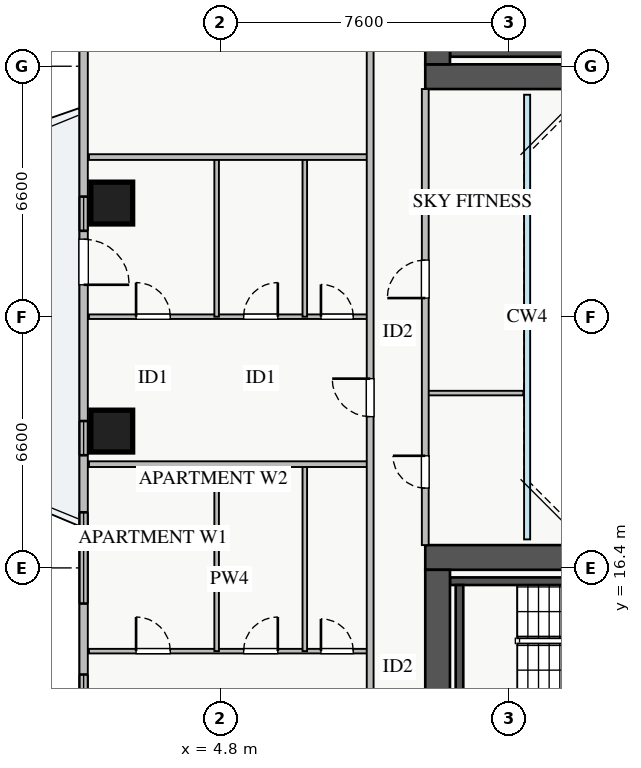
"""IFC4 building model, lengths in metres.
Left out: names, types, materials, properties, quantities, classifications, styles, units other than length and angle.
Written with IfcOpenShell. Run it as: python <this file> out.ifc"""

import sys

from ifc_helpers import new_model, si_unit, direction, frame, frame_2d, origin, origin_2d, place, context, subcontext, project, spatial, rectangle, extrude, source, transform, mapped, element, fill, save


model = new_model("IFC4")
c1 = context("Model", 3, precision=1e-05, world=origin(), true_north=direction((0.0, 1.0)))
c2 = subcontext(c1, "Body", "Model", "MODEL_VIEW")
j1 = project(units=[si_unit("LENGTHUNIT", "METRE"), si_unit("PLANEANGLEUNIT", "RADIAN")], contexts=[c1])
p1 = place(None, origin())
s1 = spatial("IfcSite", under=j1, at=p1, CompositionType="ELEMENT")
p2 = place(p1, origin())
s2 = spatial("IfcBuilding", under=s1, at=p2, CompositionType="ELEMENT")
p3 = place(p2, frame((0.0, 0.0, 106.75)))
s3 = spatial("IfcBuildingStorey", under=s2, at=p3, CompositionType="ELEMENT", Elevation=106.75)
for number, where, z_axis, x_axis in (
    (1, (10.85, 29.95, 0.0), (0.0, 0.0, 1.0), (1.0, 0.0, 0.0)),
    (2, (10.85, 16.05, 0.0), (0.0, 0.0, 1.0), (1.0, 0.0, 0.0)),
):
    element("IfcWall", number, at=place(p3, frame(where, z_axis=z_axis, x_axis=x_axis)), inside=s3, PredefinedType="SHEAR", context=c2, shape_type="SweptSolid", body=[
        extrude(rectangle(XDim=7.3, YDim=0.2, at=frame_2d((3.65, 0.0))), origin(), (0.0, 0.0, 1.0), 3.25),
    ])
p4 = place(p3, frame((11.1, 13.01, 0.0), z_axis=(0.0, 0.0, 1.0), x_axis=(0.0, 1.0, 0.0)))
e3 = element("IfcWall", 3, at=p4, inside=s3, PredefinedType="SHEAR", context=c2, shape_type="SweptSolid", body=[
    extrude(rectangle(XDim=2.94, YDim=0.2, at=frame_2d((1.47, 0.0))), origin(), (0.0, 0.0, 1.0), 3.25),
])
p5 = place(p3, frame((10.2, 29.325, 0.0), z_axis=(0.0, 0.0, 1.0), x_axis=(1.0, 0.0, 0.0)))
e4 = element("IfcWall", 4, at=p5, inside=s3, PredefinedType="SHEAR", context=c2, shape_type="SweptSolid", body=[
    extrude(rectangle(XDim=17.6, YDim=0.65, at=frame_2d((8.8, 0.0))), origin(), (0.0, 0.0, 1.0), 3.25),
])
p6 = place(p3, frame((10.525, 29.65, 0.0), z_axis=(0.0, 0.0, 1.0), x_axis=(0.0, 1.0, 0.0)))
e5 = element("IfcWall", 5, at=p6, inside=s3, PredefinedType="SHEAR", context=c2, shape_type="SweptSolid", body=[
    extrude(rectangle(XDim=5.9, YDim=0.65, at=frame_2d((2.95, 0.0))), origin(), (0.0, 0.0, 1.0), 3.25),
])
p7 = place(p3, frame((10.2, 16.675, 0.0), z_axis=(0.0, 0.0, 1.0), x_axis=(1.0, 0.0, 0.0)))
e6 = element("IfcWall", 6, at=p7, inside=s3, PredefinedType="SHEAR", context=c2, shape_type="SweptSolid", body=[
    extrude(rectangle(XDim=17.6, YDim=0.65, at=frame_2d((8.8, 0.0))), origin(), (0.0, 0.0, 1.0), 3.25),
])
p8 = place(p3, frame((10.525, 10.45, 0.0), z_axis=(0.0, 0.0, 1.0), x_axis=(0.0, 1.0, 0.0)))
e7 = element("IfcWall", 7, at=p8, inside=s3, PredefinedType="SHEAR", context=c2, shape_type="SweptSolid", body=[
    extrude(rectangle(XDim=5.9, YDim=0.65, at=frame_2d((2.95, 0.0))), origin(), (0.0, 0.0, 1.0), 3.25),
])
m1 = source(origin(), c2, "Body", "SweptSolid", [
    extrude(rectangle(XDim=1.1, YDim=1.1, at=origin_2d()), origin(), (0.0, 0.0, 1.0), 3.25),
])
for number, where, z_axis, x_axis in (
    (8, (1.95, 26.0, 0.0), (0.0, 0.0, 1.0), (1.0, 0.0, 0.0)),
    (9, (1.95, 20.0, 0.0), (0.0, 0.0, 1.0), (1.0, 0.0, 0.0)),
):
    element("IfcColumn", number, at=place(p3, frame(where, z_axis=z_axis, x_axis=x_axis)), inside=s3, PredefinedType="COLUMN", context=c2, shape_type="MappedRepresentation", body=[
        mapped(m1, transform((0.0, 0.0, 0.0), x_axis=(1.0, 0.0, 0.0), y_axis=(0.0, 1.0, 0.0), z_axis=(0.0, 0.0, 1.0), scale=1.0)),
    ])
p9 = place(p3, frame((1.21, 10.55, 0.0), z_axis=(0.0, 0.0, 1.0), x_axis=(0.0, 1.0, 0.0)))
e10 = element("IfcWall", 10, at=p9, inside=s3, PredefinedType="STANDARD", context=c2, shape_type="SweptSolid", body=[
    extrude(rectangle(XDim=24.9, YDim=0.22, at=frame_2d((12.45, 0.0))), origin(), (0.0, 0.0, 1.0), 2.61),
])
p10 = place(p9, frame((13.3, 0.0, 0.0)))
e11 = element("IfcOpeningElement", 11, at=p10, cuts=e10, PredefinedType="OPENING", context=c2, shape_type="SweptSolid", body=[
    extrude(rectangle(XDim=1.2, YDim=2.1, at=frame_2d((0.6, 1.05))), frame((0.0, 0.12, 0.0), z_axis=(0.0, -1.0, 0.0), x_axis=(1.0, 0.0, 0.0)), (0.0, 0.0, 1.0), 0.24),
])
p11 = place(p9, frame((0.645, 0.0, 0.9)))
e12 = element("IfcOpeningElement", 12, at=p11, cuts=e10, PredefinedType="OPENING", context=c2, shape_type="SweptSolid", body=[
    extrude(rectangle(XDim=2.4, YDim=1.5, at=frame_2d((1.2, 0.75))), frame((0.0, 0.12, 0.0), z_axis=(0.0, -1.0, 0.0), x_axis=(1.0, 0.0, 0.0)), (0.0, 0.0, 1.0), 0.24),
])
p12 = place(p9, frame((20.737, 0.0, 0.9)))
e13 = element("IfcOpeningElement", 13, at=p12, cuts=e10, PredefinedType="OPENING", context=c2, shape_type="SweptSolid", body=[
    extrude(rectangle(XDim=2.1, YDim=1.48, at=frame_2d((1.05, 0.74))), frame((0.0, 0.12, 0.0), z_axis=(0.0, -1.0, 0.0), x_axis=(1.0, 0.0, 0.0)), (0.0, 0.0, 1.0), 0.24),
])
p13 = place(p9, frame((4.913, 0.0, 0.9)))
e14 = element("IfcOpeningElement", 14, at=p13, cuts=e10, PredefinedType="OPENING", context=c2, shape_type="SweptSolid", body=[
    extrude(rectangle(XDim=2.4, YDim=1.5, at=frame_2d((1.2, 0.75))), frame((0.0, 0.12, 0.0), z_axis=(0.0, -1.0, 0.0), x_axis=(1.0, 0.0, 0.0)), (0.0, 0.0, 1.0), 0.24),
])
p14 = place(p9, frame((14.72, 0.0, 0.9)))
e15 = element("IfcOpeningElement", 15, at=p14, cuts=e10, PredefinedType="OPENING", context=c2, shape_type="SweptSolid", body=[
    extrude(rectangle(XDim=0.9, YDim=1.2, at=frame_2d((0.45, 0.6))), frame((0.0, 0.12, 0.0), z_axis=(0.0, -1.0, 0.0), x_axis=(1.0, 0.0, 0.0)), (0.0, 0.0, 1.0), 0.24),
])
p15 = place(p9, frame((8.815, 0.0, 0.9)))
e16 = element("IfcOpeningElement", 16, at=p15, cuts=e10, PredefinedType="OPENING", context=c2, shape_type="SweptSolid", body=[
    extrude(rectangle(XDim=0.9, YDim=1.2, at=frame_2d((0.45, 0.6))), frame((0.0, 0.12, 0.0), z_axis=(0.0, -1.0, 0.0), x_axis=(1.0, 0.0, 0.0)), (0.0, 0.0, 1.0), 0.24),
])
p16 = place(p3, frame((1.35, 14.21, 0.0), z_axis=(0.0, 0.0, 1.0), x_axis=(1.0, 0.0, 0.0)))
e17 = element("IfcWall", 17, at=p16, inside=s3, PredefinedType="PLUMBINGWALL", context=c2, shape_type="SweptSolid", body=[
    extrude(rectangle(XDim=7.4, YDim=0.12, at=frame_2d((3.7, 0.0))), origin(), (0.0, 0.0, 1.0), 3.07),
])
p17 = place(p16, frame((1.24, 0.0, 0.0)))
e18 = element("IfcOpeningElement", 18, at=p17, cuts=e17, PredefinedType="OPENING", context=c2, shape_type="SweptSolid", body=[
    extrude(rectangle(XDim=0.9, YDim=2.05, at=frame_2d((0.45, 1.025))), frame((0.0, 0.07, 0.0), z_axis=(0.0, -1.0, 0.0), x_axis=(1.0, 0.0, 0.0)), (0.0, 0.0, 1.0), 0.14),
])
p18 = place(p16, frame((4.07, 0.0, 0.0)))
e19 = element("IfcOpeningElement", 19, at=p18, cuts=e17, PredefinedType="OPENING", context=c2, shape_type="SweptSolid", body=[
    extrude(rectangle(XDim=0.9, YDim=2.05, at=frame_2d((0.45, 1.025))), frame((0.0, 0.07, 0.0), z_axis=(0.0, -1.0, 0.0), x_axis=(1.0, 0.0, 0.0)), (0.0, 0.0, 1.0), 0.14),
])
p19 = place(p16, frame((6.105, 0.0, 0.0)))
e20 = element("IfcOpeningElement", 20, at=p19, cuts=e17, PredefinedType="OPENING", context=c2, shape_type="SweptSolid", body=[
    extrude(rectangle(XDim=0.85, YDim=2.05, at=frame_2d((0.425, 1.025))), frame((0.0, 0.07, 0.0), z_axis=(0.0, -1.0, 0.0), x_axis=(1.0, 0.0, 0.0)), (0.0, 0.0, 1.0), 0.14),
])
for number, where, z_axis, x_axis in (
    (21, (4.71, 14.21, 0.0), (0.0, 0.0, 1.0), (0.0, 1.0, 0.0)),
    (22, (7.03, 14.21, 0.0), (0.0, 0.0, 1.0), (0.0, 1.0, 0.0)),
):
    element("IfcWall", number, at=place(p3, frame(where, z_axis=z_axis, x_axis=x_axis)), inside=s3, PredefinedType="PLUMBINGWALL", context=c2, shape_type="SweptSolid", body=[
        extrude(rectangle(XDim=4.92, YDim=0.12, at=frame_2d((2.46, 0.0))), origin(), (0.0, 0.0, 1.0), 3.07),
    ])
p20 = place(p3, frame((1.35, 23.01, 0.0), z_axis=(0.0, 0.0, 1.0), x_axis=(1.0, 0.0, 0.0)))
e23 = element("IfcWall", 23, at=p20, inside=s3, PredefinedType="PLUMBINGWALL", context=c2, shape_type="SweptSolid", body=[
    extrude(rectangle(XDim=7.4, YDim=0.12, at=frame_2d((3.7, 0.0))), origin(), (0.0, 0.0, 1.0), 3.07),
])
p21 = place(p20, frame((1.24, 0.0, 0.0)))
e24 = element("IfcOpeningElement", 24, at=p21, cuts=e23, PredefinedType="OPENING", context=c2, shape_type="SweptSolid", body=[
    extrude(rectangle(XDim=0.9, YDim=2.05, at=frame_2d((0.45, 1.025))), frame((0.0, 0.07, 0.0), z_axis=(0.0, -1.0, 0.0), x_axis=(1.0, 0.0, 0.0)), (0.0, 0.0, 1.0), 0.14),
])
p22 = place(p20, frame((4.07, 0.0, 0.0)))
e25 = element("IfcOpeningElement", 25, at=p22, cuts=e23, PredefinedType="OPENING", context=c2, shape_type="SweptSolid", body=[
    extrude(rectangle(XDim=0.9, YDim=2.05, at=frame_2d((0.45, 1.025))), frame((0.0, 0.07, 0.0), z_axis=(0.0, -1.0, 0.0), x_axis=(1.0, 0.0, 0.0)), (0.0, 0.0, 1.0), 0.14),
])
p23 = place(p20, frame((6.105, 0.0, 0.0)))
e26 = element("IfcOpeningElement", 26, at=p23, cuts=e23, PredefinedType="OPENING", context=c2, shape_type="SweptSolid", body=[
    extrude(rectangle(XDim=0.85, YDim=2.05, at=frame_2d((0.425, 1.025))), frame((0.0, 0.07, 0.0), z_axis=(0.0, -1.0, 0.0), x_axis=(1.0, 0.0, 0.0)), (0.0, 0.0, 1.0), 0.14),
])
for number, where, z_axis, x_axis in (
    (27, (4.71, 23.01, 0.0), (0.0, 0.0, 1.0), (0.0, 1.0, 0.0)),
    (28, (7.03, 23.01, 0.0), (0.0, 0.0, 1.0), (0.0, 1.0, 0.0)),
):
    element("IfcWall", number, at=place(p3, frame(where, z_axis=z_axis, x_axis=x_axis)), inside=s3, PredefinedType="PLUMBINGWALL", context=c2, shape_type="SweptSolid", body=[
        extrude(rectangle(XDim=4.2, YDim=0.12, at=frame_2d((2.1, 0.0))), origin(), (0.0, 0.0, 1.0), 3.07),
    ])
for number, where, z_axis, x_axis in (
    (29, (1.35, 19.13, 0.0), (0.0, 0.0, 1.0), (1.0, 0.0, 0.0)),
    (30, (1.35, 27.21, 0.0), (0.0, 0.0, 1.0), (1.0, 0.0, 0.0)),
):
    element("IfcWall", number, at=place(p3, frame(where, z_axis=z_axis, x_axis=x_axis)), inside=s3, PredefinedType="PARTITIONING", context=c2, shape_type="SweptSolid", body=[
        extrude(rectangle(XDim=7.4, YDim=0.15, at=frame_2d((3.7, 0.0))), origin(), (0.0, 0.0, 1.0), 3.07),
    ])
p24 = place(p3, frame((8.75, 8.3, 0.0), z_axis=(0.0, 0.0, 1.0), x_axis=(0.0, 1.0, 0.0)))
e31 = element("IfcWall", 31, at=p24, inside=s3, PredefinedType="PARTITIONING", context=c2, shape_type="SweptSolid", body=[
    extrude(rectangle(XDim=29.4, YDim=0.18, at=frame_2d((14.7, 0.0))), origin(), (0.0, 0.0, 1.0), 3.07),
])
p25 = place(p24, frame((28.08, 0.0, 0.0)))
e32 = element("IfcOpeningElement", 32, at=p25, cuts=e31, PredefinedType="OPENING", context=c2, shape_type="SweptSolid", body=[
    extrude(rectangle(XDim=0.9, YDim=2.05, at=frame_2d((0.45, 1.025))), frame((0.0, 0.1, 0.0), z_axis=(0.0, -1.0, 0.0), x_axis=(1.0, 0.0, 0.0)), (0.0, 0.0, 1.0), 0.2),
])
p26 = place(p24, frame((0.245, 0.0, 0.0)))
e33 = element("IfcOpeningElement", 33, at=p26, cuts=e31, PredefinedType="OPENING", context=c2, shape_type="SweptSolid", body=[
    extrude(rectangle(XDim=0.9, YDim=2.05, at=frame_2d((0.45, 1.025))), frame((0.0, 0.1, 0.0), z_axis=(0.0, -1.0, 0.0), x_axis=(1.0, 0.0, 0.0)), (0.0, 0.0, 1.0), 0.2),
])
p27 = place(p24, frame((2.95, 0.0, 0.0)))
e34 = element("IfcOpeningElement", 34, at=p27, cuts=e31, PredefinedType="OPENING", context=c2, shape_type="SweptSolid", body=[
    extrude(rectangle(XDim=1.0, YDim=2.05, at=frame_2d((0.5, 1.025))), frame((0.0, 0.1, 0.0), z_axis=(0.0, -1.0, 0.0), x_axis=(1.0, 0.0, 0.0)), (0.0, 0.0, 1.0), 0.2),
])
p28 = place(p24, frame((12.08, 0.0, 0.0)))
e35 = element("IfcOpeningElement", 35, at=p28, cuts=e31, PredefinedType="OPENING", context=c2, shape_type="SweptSolid", body=[
    extrude(rectangle(XDim=1.0, YDim=2.05, at=frame_2d((0.5, 1.025))), frame((0.0, 0.1, 0.0), z_axis=(0.0, -1.0, 0.0), x_axis=(1.0, 0.0, 0.0)), (0.0, 0.0, 1.0), 0.2),
])
p29 = place(p24, frame((22.795, 0.0, 0.0)))
e36 = element("IfcOpeningElement", 36, at=p29, cuts=e31, PredefinedType="OPENING", context=c2, shape_type="SweptSolid", body=[
    extrude(rectangle(XDim=1.0, YDim=2.05, at=frame_2d((0.5, 1.025))), frame((0.0, 0.1, 0.0), z_axis=(0.0, -1.0, 0.0), x_axis=(1.0, 0.0, 0.0)), (0.0, 0.0, 1.0), 0.2),
])
p30 = place(p3, frame((10.2, 21.0, 0.0), z_axis=(0.0, 0.0, 1.0), x_axis=(1.0, 0.0, 0.0)))
e37 = element("IfcWall", 37, at=p30, inside=s3, PredefinedType="PLUMBINGWALL", context=c2, shape_type="SweptSolid", body=[
    extrude(rectangle(XDim=2.58, YDim=0.12, at=frame_2d((1.29, 0.0))), origin(), (0.0, 0.0, 1.0), 3.07),
])
p31 = place(p3, frame((10.2, 17.0, 0.0), z_axis=(0.0, 0.0, 1.0), x_axis=(0.0, 1.0, 0.0)))
e38 = element("IfcWall", 38, at=p31, inside=s3, PredefinedType="PARTITIONING", context=c2, shape_type="SweptSolid", body=[
    extrude(rectangle(XDim=12.0, YDim=0.18, at=frame_2d((6.0, 0.0))), origin(), (0.0, 0.0, 1.0), 3.07),
])
p32 = place(p31, frame((1.5, 0.0, 0.0)))
e39 = element("IfcOpeningElement", 39, at=p32, cuts=e38, PredefinedType="OPENING", context=c2, shape_type="SweptSolid", body=[
    extrude(rectangle(XDim=0.85, YDim=2.05, at=frame_2d((0.425, 1.025))), frame((0.0, 0.1, 0.0), z_axis=(0.0, -1.0, 0.0), x_axis=(1.0, 0.0, 0.0)), (0.0, 0.0, 1.0), 0.2),
])
p33 = place(p31, frame((6.5, 0.0, 0.0)))
e40 = element("IfcOpeningElement", 40, at=p33, cuts=e38, PredefinedType="OPENING", context=c2, shape_type="SweptSolid", body=[
    extrude(rectangle(XDim=1.0, YDim=2.05, at=frame_2d((0.5, 1.025))), frame((0.0, 0.1, 0.0), z_axis=(0.0, -1.0, 0.0), x_axis=(1.0, 0.0, 0.0)), (0.0, 0.0, 1.0), 0.2),
])
m2 = source(origin(), c2, "Body", "SweptSolid", [
    extrude(rectangle(XDim=1.2, YDim=2.1, at=frame_2d((0.6, 1.05))), frame((0.0, 0.025, 0.0), z_axis=(0.0, -1.0, 0.0), x_axis=(1.0, 0.0, 0.0)), (0.0, 0.0, 1.0), 0.05),
])
p34 = place(p10, frame((1.2, 0.0, 0.0), z_axis=(0.0, 0.0, 1.0), x_axis=(-1.0, 0.0, 0.0)))
e41 = element("IfcDoor", 41, at=p34, inside=s3, OperationType="SINGLE_SWING_LEFT", PredefinedType="DOOR", context=c2, shape_type="MappedRepresentation", body=[
    mapped(m2, transform((0.0, 0.0, 0.0), x_axis=(1.0, 0.0, 0.0), y_axis=(0.0, 1.0, 0.0), z_axis=(0.0, 0.0, 1.0), scale=1.0)),
])
fill(e11, e41)
m3 = source(origin(), c2, "Body", "SweptSolid", [
    extrude(rectangle(XDim=2.4, YDim=1.5, at=frame_2d((1.2, 0.75))), frame((0.0, 0.03, 0.0), z_axis=(0.0, -1.0, 0.0), x_axis=(1.0, 0.0, 0.0)), (0.0, 0.0, 1.0), 0.06),
])
p35 = place(p11, origin())
e42 = element("IfcWindow", 42, at=p35, inside=s3, PartitioningType="TRIPLE_PANEL_VERTICAL", PredefinedType="WINDOW", context=c2, shape_type="MappedRepresentation", body=[
    mapped(m3, transform((0.0, 0.0, 0.0), x_axis=(1.0, 0.0, 0.0), y_axis=(0.0, 1.0, 0.0), z_axis=(0.0, 0.0, 1.0), scale=1.0)),
])
fill(e12, e42)
m4 = source(origin(), c2, "Body", "SweptSolid", [
    extrude(rectangle(XDim=0.9, YDim=2.05, at=frame_2d((0.45, 1.025))), frame((0.0, 0.025, 0.0), z_axis=(0.0, -1.0, 0.0), x_axis=(1.0, 0.0, 0.0)), (0.0, 0.0, 1.0), 0.05),
])
p36 = place(p17, origin())
e43 = element("IfcDoor", 43, at=p36, inside=s3, OperationType="SINGLE_SWING_LEFT", PredefinedType="DOOR", context=c2, shape_type="MappedRepresentation", body=[
    mapped(m4, transform((0.0, 0.0, 0.0), x_axis=(1.0, 0.0, 0.0), y_axis=(0.0, 1.0, 0.0), z_axis=(0.0, 0.0, 1.0), scale=1.0)),
])
fill(e18, e43)
p37 = place(p18, origin())
e44 = element("IfcDoor", 44, at=p37, inside=s3, OperationType="SINGLE_SWING_RIGHT", PredefinedType="DOOR", context=c2, shape_type="MappedRepresentation", body=[
    mapped(m4, transform((0.0, 0.0, 0.0), x_axis=(1.0, 0.0, 0.0), y_axis=(0.0, 1.0, 0.0), z_axis=(0.0, 0.0, 1.0), scale=1.0)),
])
fill(e19, e44)
m5 = source(origin(), c2, "Body", "SweptSolid", [
    extrude(rectangle(XDim=0.85, YDim=2.05, at=frame_2d((0.425, 1.025))), frame((0.0, 0.025, 0.0), z_axis=(0.0, -1.0, 0.0), x_axis=(1.0, 0.0, 0.0)), (0.0, 0.0, 1.0), 0.05),
])
p38 = place(p19, origin())
e45 = element("IfcDoor", 45, at=p38, inside=s3, OperationType="SINGLE_SWING_LEFT", PredefinedType="DOOR", context=c2, shape_type="MappedRepresentation", body=[
    mapped(m5, transform((0.0, 0.0, 0.0), x_axis=(1.0, 0.0, 0.0), y_axis=(0.0, 1.0, 0.0), z_axis=(0.0, 0.0, 1.0), scale=1.0)),
])
fill(e20, e45)
p39 = place(p21, origin())
e46 = element("IfcDoor", 46, at=p39, inside=s3, OperationType="SINGLE_SWING_LEFT", PredefinedType="DOOR", context=c2, shape_type="MappedRepresentation", body=[
    mapped(m4, transform((0.0, 0.0, 0.0), x_axis=(1.0, 0.0, 0.0), y_axis=(0.0, 1.0, 0.0), z_axis=(0.0, 0.0, 1.0), scale=1.0)),
])
fill(e24, e46)
p40 = place(p22, origin())
e47 = element("IfcDoor", 47, at=p40, inside=s3, OperationType="SINGLE_SWING_RIGHT", PredefinedType="DOOR", context=c2, shape_type="MappedRepresentation", body=[
    mapped(m4, transform((0.0, 0.0, 0.0), x_axis=(1.0, 0.0, 0.0), y_axis=(0.0, 1.0, 0.0), z_axis=(0.0, 0.0, 1.0), scale=1.0)),
])
fill(e25, e47)
p41 = place(p23, origin())
e48 = element("IfcDoor", 48, at=p41, inside=s3, OperationType="SINGLE_SWING_LEFT", PredefinedType="DOOR", context=c2, shape_type="MappedRepresentation", body=[
    mapped(m5, transform((0.0, 0.0, 0.0), x_axis=(1.0, 0.0, 0.0), y_axis=(0.0, 1.0, 0.0), z_axis=(0.0, 0.0, 1.0), scale=1.0)),
])
fill(e26, e48)
m6 = source(origin(), c2, "Body", "SweptSolid", [
    extrude(rectangle(XDim=1.0, YDim=2.05, at=frame_2d((0.5, 1.025))), frame((0.0, 0.025, 0.0), z_axis=(0.0, -1.0, 0.0), x_axis=(1.0, 0.0, 0.0)), (0.0, 0.0, 1.0), 0.05),
])
p42 = place(p28, origin())
e49 = element("IfcDoor", 49, at=p42, inside=s3, OperationType="SINGLE_SWING_RIGHT", PredefinedType="DOOR", context=c2, shape_type="MappedRepresentation", body=[
    mapped(m6, transform((0.0, 0.0, 0.0), x_axis=(1.0, 0.0, 0.0), y_axis=(0.0, 1.0, 0.0), z_axis=(0.0, 0.0, 1.0), scale=1.0)),
])
fill(e35, e49)
p43 = place(p32, origin())
e50 = element("IfcDoor", 50, at=p43, inside=s3, OperationType="SINGLE_SWING_RIGHT", PredefinedType="DOOR", context=c2, shape_type="MappedRepresentation", body=[
    mapped(m5, transform((0.0, 0.0, 0.0), x_axis=(1.0, 0.0, 0.0), y_axis=(0.0, 1.0, 0.0), z_axis=(0.0, 0.0, 1.0), scale=1.0)),
])
fill(e39, e50)
p44 = place(p33, origin())
e51 = element("IfcDoor", 51, at=p44, inside=s3, OperationType="SINGLE_SWING_LEFT", PredefinedType="DOOR", context=c2, shape_type="MappedRepresentation", body=[
    mapped(m6, transform((0.0, 0.0, 0.0), x_axis=(1.0, 0.0, 0.0), y_axis=(0.0, 1.0, 0.0), z_axis=(0.0, 0.0, 1.0), scale=1.0)),
])
fill(e40, e51)
p45 = place(p13, origin())
e52 = element("IfcWindow", 52, at=p45, inside=s3, PartitioningType="TRIPLE_PANEL_VERTICAL", PredefinedType="WINDOW", context=c2, shape_type="MappedRepresentation", body=[
    mapped(m3, transform((0.0, 0.0, 0.0), x_axis=(1.0, 0.0, 0.0), y_axis=(0.0, 1.0, 0.0), z_axis=(0.0, 0.0, 1.0), scale=1.0)),
])
fill(e14, e52)
m7 = source(origin(), c2, "Body", "SweptSolid", [
    extrude(rectangle(XDim=0.9, YDim=1.2, at=frame_2d((0.45, 0.6))), frame((0.0, 0.03, 0.0), z_axis=(0.0, -1.0, 0.0), x_axis=(1.0, 0.0, 0.0)), (0.0, 0.0, 1.0), 0.06),
])
p46 = place(p14, origin())
e53 = element("IfcWindow", 53, at=p46, inside=s3, PartitioningType="SINGLE_PANEL", PredefinedType="WINDOW", context=c2, shape_type="MappedRepresentation", body=[
    mapped(m7, transform((0.0, 0.0, 0.0), x_axis=(1.0, 0.0, 0.0), y_axis=(0.0, 1.0, 0.0), z_axis=(0.0, 0.0, 1.0), scale=1.0)),
])
fill(e15, e53)
p47 = place(p15, origin())
e54 = element("IfcWindow", 54, at=p47, inside=s3, PartitioningType="SINGLE_PANEL", PredefinedType="WINDOW", context=c2, shape_type="MappedRepresentation", body=[
    mapped(m7, transform((0.0, 0.0, 0.0), x_axis=(1.0, 0.0, 0.0), y_axis=(0.0, 1.0, 0.0), z_axis=(0.0, 0.0, 1.0), scale=1.0)),
])
fill(e16, e54)
save(model, sys.argv[1])
